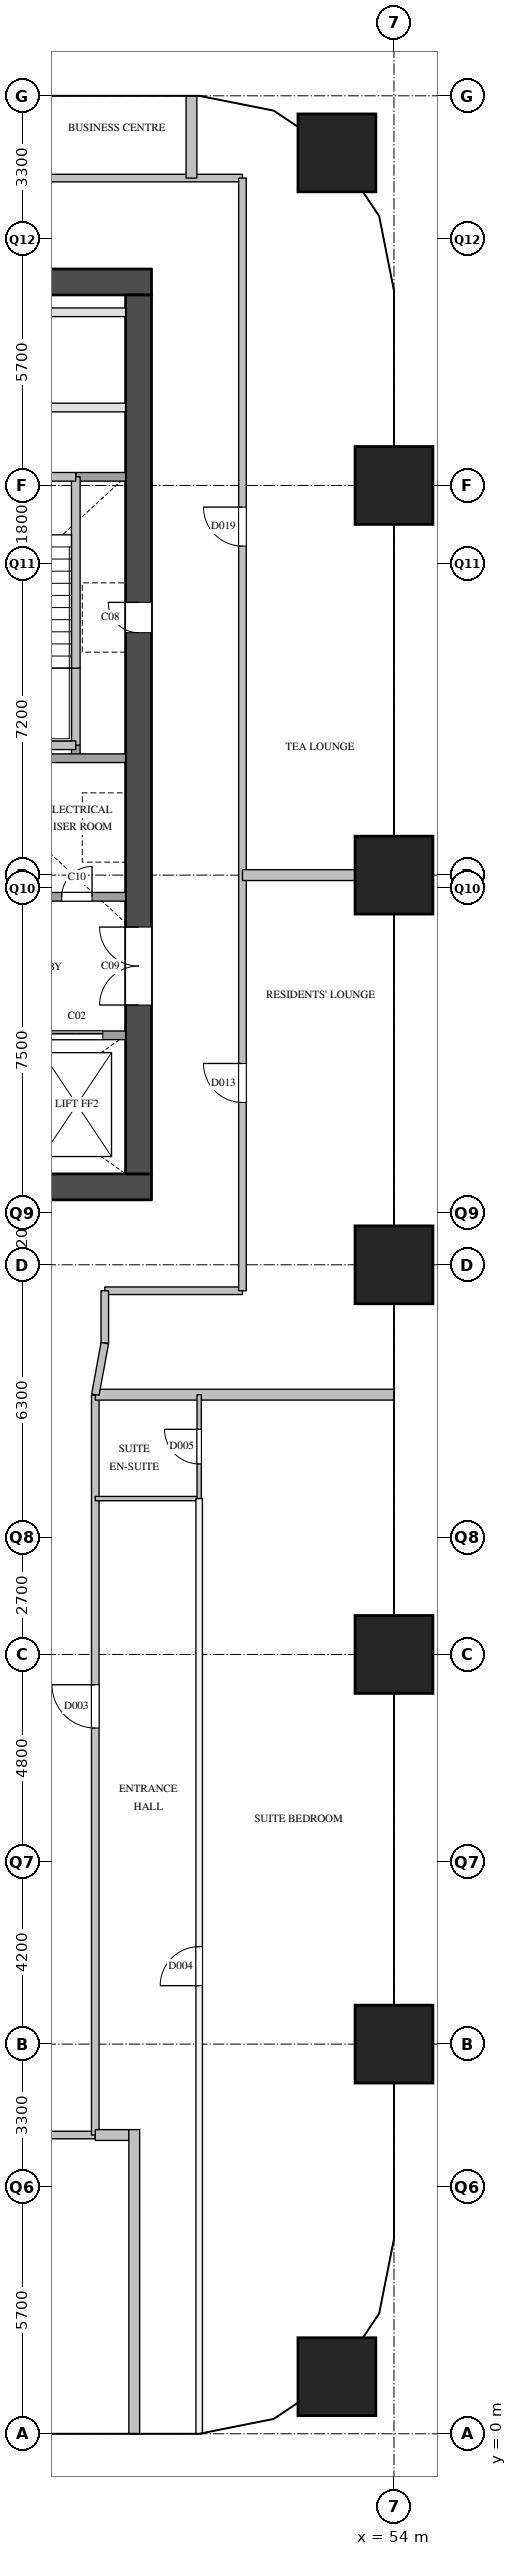
"""IFC4 building model, lengths in metres.
Left out: names, types, materials, properties, quantities, classifications, styles, units other than length and angle.
Written with IfcOpenShell. Run it as: python <this file> out.ifc"""

import sys

from ifc_helpers import new_model, si_unit, direction, frame, frame_2d, origin, origin_2d, place, context, subcontext, project, spatial, rectangle, extrude, element, fill, save


model = new_model("IFC4")
c1 = context("Model", 3, precision=1e-05, world=origin(), true_north=direction((0.0, 1.0)))
c2 = subcontext(c1, "Body", "Model", "MODEL_VIEW")
j1 = project(units=[si_unit("LENGTHUNIT", "METRE"), si_unit("PLANEANGLEUNIT", "RADIAN")], contexts=[c1])
p1 = place(None, origin())
s1 = spatial("IfcSite", under=j1, at=p1, CompositionType="ELEMENT")
p2 = place(p1, origin())
s2 = spatial("IfcBuilding", under=s1, at=p2, CompositionType="ELEMENT")
p3 = place(p2, frame((0.0, 0.0, 93.0)))
s3 = spatial("IfcBuildingStorey", under=s2, at=p3, CompositionType="ELEMENT", Elevation=93.0)
for number, where, z_axis, x_axis in (
    (1, (52.682, 1.318, 0.0), (0.0, 0.0, 1.0), (1.0, 0.0, 0.0)),
    (2, (54.0, 9.0, 0.0), (0.0, 0.0, 1.0), (1.0, 0.0, 0.0)),
    (3, (54.0, 18.0, 0.0), (0.0, 0.0, 1.0), (1.0, 0.0, 0.0)),
    (4, (54.0, 27.0, 0.0), (0.0, 0.0, 1.0), (1.0, 0.0, 0.0)),
    (5, (54.0, 36.0, 0.0), (0.0, 0.0, 1.0), (1.0, 0.0, 0.0)),
    (6, (54.0, 45.0, 0.0), (0.0, 0.0, 1.0), (1.0, 0.0, 0.0)),
    (7, (52.682, 52.682, 0.0), (0.0, 0.0, 1.0), (1.0, 0.0, 0.0)),
):
    element("IfcColumn", number, at=place(p3, frame(where, z_axis=z_axis, x_axis=x_axis)), inside=s3, PredefinedType="COLUMN", context=c2, shape_type="SweptSolid", body=[
        extrude(rectangle(XDim=1.8, YDim=1.8, at=origin_2d()), origin(), (0.0, 0.0, 1.0), 3.8),
    ])
for number, where, z_axis, x_axis in (
    (8, (36.0, 28.8, 0.0), (0.0, 0.0, 1.0), (1.0, 0.0, 0.0)),
    (9, (36.0, 49.7, 0.0), (0.0, 0.0, 1.0), (1.0, 0.0, 0.0)),
):
    element("IfcWall", number, at=place(p3, frame(where, z_axis=z_axis, x_axis=x_axis)), inside=s3, PredefinedType="SHEAR", context=c2, shape_type="SweptSolid", body=[
        extrude(rectangle(XDim=12.4, YDim=0.6, at=frame_2d((6.2, 0.0))), origin(), (0.0, 0.0, 1.0), 3.5),
    ])
p4 = place(p3, frame((48.1, 29.1, 0.0), z_axis=(0.0, 0.0, 1.0), x_axis=(0.0, 1.0, 0.0)))
e10 = element("IfcWall", 10, at=p4, inside=s3, PredefinedType="SHEAR", context=c2, shape_type="SweptSolid", body=[
    extrude(rectangle(XDim=20.3, YDim=0.6, at=frame_2d((10.15, 0.0))), origin(), (0.0, 0.0, 1.0), 3.5),
])
p5 = place(p4, frame((12.5, 0.0, 0.0)))
e11 = element("IfcOpeningElement", 11, at=p5, cuts=e10, PredefinedType="OPENING", context=c2, shape_type="SweptSolid", body=[
    extrude(rectangle(XDim=0.7, YDim=2.1, at=frame_2d((0.35, 1.05))), frame((0.0, 0.31, 0.0), z_axis=(0.0, -1.0, 0.0), x_axis=(1.0, 0.0, 0.0)), (0.0, 0.0, 1.0), 0.62),
])
p6 = place(p4, frame((3.9, 0.0, 0.0)))
e12 = element("IfcOpeningElement", 12, at=p6, cuts=e10, PredefinedType="OPENING", context=c2, shape_type="SweptSolid", body=[
    extrude(rectangle(XDim=1.8, YDim=2.1, at=frame_2d((0.9, 1.05))), frame((0.0, 0.31, 0.0), z_axis=(0.0, -1.0, 0.0), x_axis=(1.0, 0.0, 0.0)), (0.0, 0.0, 1.0), 0.62),
])
p7 = place(p3, frame((46.65, 38.7, 0.0), z_axis=(0.0, 0.0, 1.0), x_axis=(0.0, 1.0, 0.0)))
e13 = element("IfcWall", 13, at=p7, inside=s3, PredefinedType="SOLIDWALL", context=c2, shape_type="SweptSolid", body=[
    extrude(rectangle(XDim=0.3, YDim=0.2, at=frame_2d((0.15, 0.0))), origin(), (0.0, 0.0, 1.0), 3.5),
])
p8 = place(p3, frame((46.65, 39.0, 0.0), z_axis=(0.0, 0.0, 1.0), x_axis=(0.0, 1.0, 0.0)))
e14 = element("IfcWall", 14, at=p8, inside=s3, PredefinedType="SOLIDWALL", context=c2, shape_type="SweptSolid", body=[
    extrude(rectangle(XDim=1.78, YDim=0.2, at=frame_2d((0.89, 0.0))), origin(), (0.0, 0.0, 1.0), 3.5),
])
p9 = place(p3, frame((46.65, 40.78, 0.0), z_axis=(0.0, 0.0, 1.0), x_axis=(0.0, 1.0, 0.0)))
e15 = element("IfcWall", 15, at=p9, inside=s3, PredefinedType="SOLIDWALL", context=c2, shape_type="SweptSolid", body=[
    extrude(rectangle(XDim=4.42, YDim=0.2, at=frame_2d((2.21, 0.0))), origin(), (0.0, 0.0, 1.0), 3.5),
])
p10 = place(p3, frame((36.6, 32.3, 0.0), z_axis=(0.0, 0.0, 1.0), x_axis=(1.0, 0.0, 0.0)))
e16 = element("IfcWall", 16, at=p10, inside=s3, PredefinedType="SOLIDWALL", context=c2, shape_type="SweptSolid", body=[
    extrude(rectangle(XDim=11.2, YDim=0.2, at=frame_2d((5.6, 0.0))), origin(), (0.0, 0.0, 1.0), 3.5),
])
p11 = place(p10, frame((7.225, 0.0, 0.0)))
e17 = element("IfcOpeningElement", 17, at=p11, cuts=e16, PredefinedType="OPENING", context=c2, shape_type="SweptSolid", body=[
    extrude(rectangle(XDim=1.2, YDim=2.1, at=frame_2d((0.6, 1.05))), frame((0.0, 0.11, 0.0), z_axis=(0.0, -1.0, 0.0), x_axis=(1.0, 0.0, 0.0)), (0.0, 0.0, 1.0), 0.22),
])
p12 = place(p10, frame((9.475, 0.0, 0.0)))
e18 = element("IfcOpeningElement", 18, at=p12, cuts=e16, PredefinedType="OPENING", context=c2, shape_type="SweptSolid", body=[
    extrude(rectangle(XDim=1.2, YDim=2.1, at=frame_2d((0.6, 1.05))), frame((0.0, 0.11, 0.0), z_axis=(0.0, -1.0, 0.0), x_axis=(1.0, 0.0, 0.0)), (0.0, 0.0, 1.0), 0.22),
])
p13 = place(p3, frame((43.3, 35.5, 0.0), z_axis=(0.0, 0.0, 1.0), x_axis=(1.0, 0.0, 0.0)))
e19 = element("IfcWall", 19, at=p13, inside=s3, PredefinedType="SOLIDWALL", context=c2, shape_type="SweptSolid", body=[
    extrude(rectangle(XDim=4.5, YDim=0.2, at=frame_2d((2.25, 0.0))), origin(), (0.0, 0.0, 1.0), 3.5),
])
p14 = place(p13, frame((0.525, 0.0, 0.0)))
e20 = element("IfcOpeningElement", 20, at=p14, cuts=e19, PredefinedType="OPENING", context=c2, shape_type="SweptSolid", body=[
    extrude(rectangle(XDim=1.2, YDim=2.1, at=frame_2d((0.6, 1.05))), frame((0.0, 0.11, 0.0), z_axis=(0.0, -1.0, 0.0), x_axis=(1.0, 0.0, 0.0)), (0.0, 0.0, 1.0), 0.22),
])
p15 = place(p13, frame((3.025, 0.0, 0.0)))
e21 = element("IfcOpeningElement", 21, at=p15, cuts=e19, PredefinedType="OPENING", context=c2, shape_type="SweptSolid", body=[
    extrude(rectangle(XDim=0.7, YDim=2.1, at=frame_2d((0.35, 1.05))), frame((0.0, 0.11, 0.0), z_axis=(0.0, -1.0, 0.0), x_axis=(1.0, 0.0, 0.0)), (0.0, 0.0, 1.0), 0.22),
])
p16 = place(p3, frame((43.3, 38.7, 0.0), z_axis=(0.0, 0.0, 1.0), x_axis=(1.0, 0.0, 0.0)))
e22 = element("IfcWall", 22, at=p16, inside=s3, PredefinedType="SOLIDWALL", context=c2, shape_type="SweptSolid", body=[
    extrude(rectangle(XDim=4.5, YDim=0.2, at=frame_2d((2.25, 0.0))), origin(), (0.0, 0.0, 1.0), 3.5),
])
p17 = place(p3, frame((43.4, 39.0, 0.0), z_axis=(0.0, 0.0, 1.0), x_axis=(1.0, 0.0, 0.0)))
e23 = element("IfcWall", 23, at=p17, inside=s3, PredefinedType="SOLIDWALL", context=c2, shape_type="SweptSolid", body=[
    extrude(rectangle(XDim=3.25, YDim=0.2, at=frame_2d((1.625, 0.0))), origin(), (0.0, 0.0, 1.0), 3.5),
])
p18 = place(p3, frame((46.65, 45.2, 0.0), z_axis=(0.0, 0.0, 1.0), x_axis=(1.0, 0.0, 0.0)))
e24 = element("IfcWall", 24, at=p18, inside=s3, PredefinedType="SOLIDWALL", context=c2, shape_type="SweptSolid", body=[
    extrude(rectangle(XDim=1.15, YDim=0.2, at=frame_2d((0.575, 0.0))), origin(), (0.0, 0.0, 1.0), 3.5),
])
p19 = place(p3, frame((36.6, 45.2, 0.0), z_axis=(0.0, 0.0, 1.0), x_axis=(1.0, 0.0, 0.0)))
e25 = element("IfcWall", 25, at=p19, inside=s3, PredefinedType="SOLIDWALL", context=c2, shape_type="SweptSolid", body=[
    extrude(rectangle(XDim=10.05, YDim=0.2, at=frame_2d((5.025, 0.0))), origin(), (0.0, 0.0, 1.0), 3.5),
])
p20 = place(p19, frame((1.125, 0.0, 0.0)))
e26 = element("IfcOpeningElement", 26, at=p20, cuts=e25, PredefinedType="OPENING", context=c2, shape_type="SweptSolid", body=[
    extrude(rectangle(XDim=1.1, YDim=2.1, at=frame_2d((0.55, 1.05))), frame((0.0, 0.11, 0.0), z_axis=(0.0, -1.0, 0.0), x_axis=(1.0, 0.0, 0.0)), (0.0, 0.0, 1.0), 0.22),
])
p21 = place(p19, frame((4.475, 0.0, 0.0)))
e27 = element("IfcOpeningElement", 27, at=p21, cuts=e25, PredefinedType="OPENING", context=c2, shape_type="SweptSolid", body=[
    extrude(rectangle(XDim=1.1, YDim=2.1, at=frame_2d((0.55, 1.05))), frame((0.0, 0.11, 0.0), z_axis=(0.0, -1.0, 0.0), x_axis=(1.0, 0.0, 0.0)), (0.0, 0.0, 1.0), 0.22),
])
p22 = place(p19, frame((7.825, 0.0, 0.0)))
e28 = element("IfcOpeningElement", 28, at=p22, cuts=e25, PredefinedType="OPENING", context=c2, shape_type="SweptSolid", body=[
    extrude(rectangle(XDim=1.1, YDim=2.1, at=frame_2d((0.55, 1.05))), frame((0.0, 0.11, 0.0), z_axis=(0.0, -1.0, 0.0), x_axis=(1.0, 0.0, 0.0)), (0.0, 0.0, 1.0), 0.22),
])
p23 = place(p3, frame((36.6, 46.8, 0.0), z_axis=(0.0, 0.0, 1.0), x_axis=(1.0, 0.0, 0.0)))
e29 = element("IfcWall", 29, at=p23, inside=s3, PredefinedType="PARTITIONING", context=c2, shape_type="SweptSolid", body=[
    extrude(rectangle(XDim=11.2, YDim=0.2, at=frame_2d((5.6, 0.0))), origin(), (0.0, 0.0, 1.0), 3.5),
])
p24 = place(p23, frame((5.15, 0.0, 0.0)))
e30 = element("IfcOpeningElement", 30, at=p24, cuts=e29, PredefinedType="OPENING", context=c2, shape_type="SweptSolid", body=[
    extrude(rectangle(XDim=0.9, YDim=2.1, at=frame_2d((0.45, 1.05))), frame((0.0, 0.11, 0.0), z_axis=(0.0, -1.0, 0.0), x_axis=(1.0, 0.0, 0.0)), (0.0, 0.0, 1.0), 0.22),
])
p25 = place(p3, frame((36.6, 49.0, 0.0), z_axis=(0.0, 0.0, 1.0), x_axis=(1.0, 0.0, 0.0)))
e31 = element("IfcWall", 31, at=p25, inside=s3, PredefinedType="PARTITIONING", context=c2, shape_type="SweptSolid", body=[
    extrude(rectangle(XDim=11.2, YDim=0.2, at=frame_2d((5.6, 0.0))), origin(), (0.0, 0.0, 1.0), 3.5),
])
p26 = place(p3, frame((33.9, 6.9, 0.0), z_axis=(0.0, 0.0, 1.0), x_axis=(1.0, 0.0, 0.0)))
e32 = element("IfcWall", 32, at=p26, inside=s3, PredefinedType="PARTITIONING", context=c2, shape_type="SweptSolid", body=[
    extrude(rectangle(XDim=13.2, YDim=0.175, at=frame_2d((6.6, 0.0))), origin(), (0.0, 0.0, 1.0), 3.5),
])
p27 = place(p26, frame((7.2, 0.0, 0.0)))
e33 = element("IfcOpeningElement", 33, at=p27, cuts=e32, PredefinedType="OPENING", context=c2, shape_type="SweptSolid", body=[
    extrude(rectangle(XDim=0.9, YDim=2.1, at=frame_2d((0.45, 1.05))), frame((0.0, 0.097, 0.0), z_axis=(0.0, -1.0, 0.0), x_axis=(1.0, 0.0, 0.0)), (0.0, 0.0, 1.0), 0.195),
])
p28 = place(p3, frame((47.32, 26.4, 0.0), z_axis=(0.0, 0.0, 1.0), x_axis=(1.0, 0.0, 0.0)))
e34 = element("IfcWall", 34, at=p28, inside=s3, PredefinedType="PARTITIONING", context=c2, shape_type="SweptSolid", body=[
    extrude(rectangle(XDim=3.18, YDim=0.175, at=frame_2d((1.59, 0.0))), origin(), (0.0, 0.0, 1.0), 3.5),
])
p29 = place(p3, frame((33.9, 52.1, 0.0), z_axis=(0.0, 0.0, 1.0), x_axis=(1.0, 0.0, 0.0)))
e35 = element("IfcWall", 35, at=p29, inside=s3, PredefinedType="PARTITIONING", context=c2, shape_type="SweptSolid", body=[
    extrude(rectangle(XDim=16.6, YDim=0.175, at=frame_2d((8.3, 0.0))), origin(), (0.0, 0.0, 1.0), 3.5),
])
p30 = place(p29, frame((8.311, 0.0, 0.0)))
e36 = element("IfcOpeningElement", 36, at=p30, cuts=e35, PredefinedType="OPENING", context=c2, shape_type="SweptSolid", body=[
    extrude(rectangle(XDim=0.9, YDim=2.1, at=frame_2d((0.45, 1.05))), frame((0.0, 0.097, 0.0), z_axis=(0.0, -1.0, 0.0), x_axis=(1.0, 0.0, 0.0)), (0.0, 0.0, 1.0), 0.195),
])
p31 = place(p3, frame((47.1, 6.9, 0.0), z_axis=(0.0, 0.0, 1.0), x_axis=(0.0, 1.0, 0.0)))
e37 = element("IfcWall", 37, at=p31, inside=s3, PredefinedType="PARTITIONING", context=c2, shape_type="SweptSolid", body=[
    extrude(rectangle(XDim=17.09, YDim=0.175, at=frame_2d((8.545, 0.0))), origin(), (0.0, 0.0, 1.0), 3.5),
])
p32 = place(p31, frame((9.4, 0.0, 0.0)))
e38 = element("IfcOpeningElement", 38, at=p32, cuts=e37, PredefinedType="OPENING", context=c2, shape_type="SweptSolid", body=[
    extrude(rectangle(XDim=1.0, YDim=2.1, at=frame_2d((0.5, 1.05))), frame((0.0, 0.097, 0.0), z_axis=(0.0, -1.0, 0.0), x_axis=(1.0, 0.0, 0.0)), (0.0, 0.0, 1.0), 0.195),
])
p33 = place(p3, frame((47.32, 25.19, 0.0), z_axis=(0.0, 0.0, 1.0), x_axis=(0.0, 1.0, 0.0)))
e39 = element("IfcWall", 39, at=p33, inside=s3, PredefinedType="PARTITIONING", context=c2, shape_type="SweptSolid", body=[
    extrude(rectangle(XDim=1.21, YDim=0.175, at=frame_2d((0.605, 0.0))), origin(), (0.0, 0.0, 1.0), 3.5),
])
p34 = place(p3, frame((50.5, 26.4, 0.0), z_axis=(0.0, 0.0, 1.0), x_axis=(0.0, 1.0, 0.0)))
e40 = element("IfcWall", 40, at=p34, inside=s3, PredefinedType="PARTITIONING", context=c2, shape_type="SweptSolid", body=[
    extrude(rectangle(XDim=25.7, YDim=0.175, at=frame_2d((12.85, 0.0))), origin(), (0.0, 0.0, 1.0), 2.5),
])
p35 = place(p34, frame((4.35, 0.0, 0.0)))
e41 = element("IfcOpeningElement", 41, at=p35, cuts=e40, PredefinedType="OPENING", context=c2, shape_type="SweptSolid", body=[
    extrude(rectangle(XDim=0.9, YDim=2.1, at=frame_2d((0.45, 1.05))), frame((0.0, 0.097, 0.0), z_axis=(0.0, -1.0, 0.0), x_axis=(1.0, 0.0, 0.0)), (0.0, 0.0, 1.0), 0.195),
])
p36 = place(p34, frame((17.2, 0.0, 0.0)))
e42 = element("IfcOpeningElement", 42, at=p36, cuts=e40, PredefinedType="OPENING", context=c2, shape_type="SweptSolid", body=[
    extrude(rectangle(XDim=0.9, YDim=2.1, at=frame_2d((0.45, 1.05))), frame((0.0, 0.097, 0.0), z_axis=(0.0, -1.0, 0.0), x_axis=(1.0, 0.0, 0.0)), (0.0, 0.0, 1.0), 0.195),
])
p37 = place(p3, frame((49.5, 0.0, 0.0), z_axis=(0.0, 0.0, 1.0), x_axis=(0.0, 1.0, 0.0)))
e43 = element("IfcWall", 43, at=p37, inside=s3, PredefinedType="PARTITIONING", context=c2, shape_type="SweptSolid", body=[
    extrude(rectangle(XDim=21.6, YDim=0.15, at=frame_2d((10.8, 0.0))), origin(), (0.0, 0.0, 1.0), 2.5),
])
p38 = place(p37, frame((10.35, 0.0, 0.0)))
e44 = element("IfcOpeningElement", 44, at=p38, cuts=e43, PredefinedType="OPENING", context=c2, shape_type="SweptSolid", body=[
    extrude(rectangle(XDim=0.9, YDim=2.1, at=frame_2d((0.45, 1.05))), frame((0.0, 0.085, 0.0), z_axis=(0.0, -1.0, 0.0), x_axis=(1.0, 0.0, 0.0)), (0.0, 0.0, 1.0), 0.17),
])
p39 = place(p3, frame((47.1, 6.9, 0.0), z_axis=(0.0, 0.0, 1.0), x_axis=(1.0, 0.0, 0.0)))
e45 = element("IfcWall", 45, at=p39, inside=s3, PredefinedType="PARTITIONING", context=c2, shape_type="SweptSolid", body=[
    extrude(rectangle(XDim=0.775, YDim=0.25, at=frame_2d((0.387, 0.0))), origin(), (0.0, 0.0, 1.0), 3.5),
])
p40 = place(p3, frame((47.102, 24.0, 0.0), z_axis=(0.0, 0.0, 1.0), x_axis=(1.0, 0.0, 0.0)))
e46 = element("IfcWall", 46, at=p40, inside=s3, PredefinedType="PARTITIONING", context=c2, shape_type="SweptSolid", body=[
    extrude(rectangle(XDim=6.898, YDim=0.25, at=frame_2d((3.449, 0.0))), origin(), (0.0, 0.0, 1.0), 2.5),
])
p41 = place(p3, frame((50.5, 36.0, 0.0), z_axis=(0.0, 0.0, 1.0), x_axis=(1.0, 0.0, 0.0)))
e47 = element("IfcWall", 47, at=p41, inside=s3, PredefinedType="PARTITIONING", context=c2, shape_type="SweptSolid", body=[
    extrude(rectangle(XDim=3.5, YDim=0.25, at=frame_2d((1.75, 0.0))), origin(), (0.0, 0.0, 1.0), 3.5),
])
p42 = place(p3, frame((48.0, 0.0, 0.0), z_axis=(0.0, 0.0, 1.0), x_axis=(0.0, 1.0, 0.0)))
e48 = element("IfcWall", 48, at=p42, inside=s3, PredefinedType="PARTITIONING", context=c2, shape_type="SweptSolid", body=[
    extrude(rectangle(XDim=7.025, YDim=0.25, at=frame_2d((3.512, 0.0))), origin(), (0.0, 0.0, 1.0), 2.5),
])
p43 = place(p3, frame((49.322, 52.1, 0.0), z_axis=(0.0, 0.0, 1.0), x_axis=(0.0, 1.0, 0.0)))
e49 = element("IfcWall", 49, at=p43, inside=s3, PredefinedType="PARTITIONING", context=c2, shape_type="SweptSolid", body=[
    extrude(rectangle(XDim=1.9, YDim=0.25, at=frame_2d((0.95, 0.0))), origin(), (0.0, 0.0, 1.0), 2.5),
])
p44 = place(p3, frame((47.1, 21.6, 0.0), z_axis=(0.0, 0.0, 1.0), x_axis=(1.0, 0.0, 0.0)))
e50 = element("IfcWall", 50, at=p44, inside=s3, PredefinedType="PARTITIONING", context=c2, shape_type="SweptSolid", body=[
    extrude(rectangle(XDim=2.4, YDim=0.1, at=frame_2d((1.2, 0.0))), origin(), (0.0, 0.0, 1.0), 3.5),
])
p45 = place(p3, frame((49.5, 21.6, 0.0), z_axis=(0.0, 0.0, 1.0), x_axis=(0.0, 1.0, 0.0)))
e51 = element("IfcWall", 51, at=p45, inside=s3, PredefinedType="PARTITIONING", context=c2, shape_type="SweptSolid", body=[
    extrude(rectangle(XDim=2.4, YDim=0.1, at=frame_2d((1.2, 0.0))), origin(), (0.0, 0.0, 1.0), 3.5),
])
p46 = place(p45, frame((0.8, 0.0, 0.0)))
e52 = element("IfcOpeningElement", 52, at=p46, cuts=e51, PredefinedType="OPENING", context=c2, shape_type="SweptSolid", body=[
    extrude(rectangle(XDim=0.8, YDim=2.1, at=frame_2d((0.4, 1.05))), frame((0.0, 0.06, 0.0), z_axis=(0.0, -1.0, 0.0), x_axis=(1.0, 0.0, 0.0)), (0.0, 0.0, 1.0), 0.12),
])
p47 = place(p3, frame((47.32, 25.19, 0.0), z_axis=(0.0, 0.0, 1.0), x_axis=(-0.180412472784, -0.983591042895, 0.0)))
e53 = element("IfcWall", 53, at=p47, inside=s3, PredefinedType="PARTITIONING", context=c2, shape_type="SweptSolid", body=[
    extrude(rectangle(XDim=1.21, YDim=0.175, at=frame_2d((0.605, 0.0))), origin(), (0.0, 0.0, 1.0), 3.5),
])
p48 = place(p12, origin())
e54 = element("IfcDoor", 54, at=p48, inside=s3, OperationType="SLIDING_TO_LEFT", PredefinedType="DOOR", context=c2, shape_type="SweptSolid", body=[
    extrude(rectangle(XDim=1.2, YDim=2.1, at=frame_2d((0.6, 1.05))), frame((0.0, 0.025, 0.0), z_axis=(0.0, -1.0, 0.0), x_axis=(1.0, 0.0, 0.0)), (0.0, 0.0, 1.0), 0.05),
])
fill(e18, e54)
p49 = place(p5, origin())
e55 = element("IfcDoor", 55, at=p49, inside=s3, OperationType="SINGLE_SWING_RIGHT", PredefinedType="DOOR", context=c2, shape_type="SweptSolid", body=[
    extrude(rectangle(XDim=0.7, YDim=2.1, at=frame_2d((0.35, 1.05))), frame((0.0, 0.025, 0.0), z_axis=(0.0, -1.0, 0.0), x_axis=(1.0, 0.0, 0.0)), (0.0, 0.0, 1.0), 0.05),
])
fill(e11, e55)
p50 = place(p6, origin())
e56 = element("IfcDoor", 56, at=p50, inside=s3, OperationType="DOUBLE_DOOR_SINGLE_SWING", PredefinedType="DOOR", context=c2, shape_type="SweptSolid", body=[
    extrude(rectangle(XDim=1.8, YDim=2.1, at=frame_2d((0.9, 1.05))), frame((0.0, 0.025, 0.0), z_axis=(0.0, -1.0, 0.0), x_axis=(1.0, 0.0, 0.0)), (0.0, 0.0, 1.0), 0.05),
])
fill(e12, e56)
p51 = place(p15, origin())
e57 = element("IfcDoor", 57, at=p51, inside=s3, OperationType="SINGLE_SWING_RIGHT", PredefinedType="DOOR", context=c2, shape_type="SweptSolid", body=[
    extrude(rectangle(XDim=0.7, YDim=2.1, at=frame_2d((0.35, 1.05))), frame((0.0, 0.025, 0.0), z_axis=(0.0, -1.0, 0.0), x_axis=(1.0, 0.0, 0.0)), (0.0, 0.0, 1.0), 0.05),
])
fill(e21, e57)
p52 = place(p32, origin())
e58 = element("IfcDoor", 58, at=p52, inside=s3, OperationType="SINGLE_SWING_RIGHT", PredefinedType="DOOR", context=c2, shape_type="SweptSolid", body=[
    extrude(rectangle(XDim=1.0, YDim=2.1, at=frame_2d((0.5, 1.05))), frame((0.0, 0.025, 0.0), z_axis=(0.0, -1.0, 0.0), x_axis=(1.0, 0.0, 0.0)), (0.0, 0.0, 1.0), 0.05),
])
fill(e38, e58)
p53 = place(p38, origin())
e59 = element("IfcDoor", 59, at=p53, inside=s3, OperationType="SINGLE_SWING_LEFT", PredefinedType="DOOR", context=c2, shape_type="SweptSolid", body=[
    extrude(rectangle(XDim=0.9, YDim=2.1, at=frame_2d((0.45, 1.05))), frame((0.0, 0.025, 0.0), z_axis=(0.0, -1.0, 0.0), x_axis=(1.0, 0.0, 0.0)), (0.0, 0.0, 1.0), 0.05),
])
fill(e44, e59)
p54 = place(p46, origin())
e60 = element("IfcDoor", 60, at=p54, inside=s3, OperationType="SINGLE_SWING_RIGHT", PredefinedType="DOOR", context=c2, shape_type="SweptSolid", body=[
    extrude(rectangle(XDim=0.8, YDim=2.1, at=frame_2d((0.4, 1.05))), frame((0.0, 0.025, 0.0), z_axis=(0.0, -1.0, 0.0), x_axis=(1.0, 0.0, 0.0)), (0.0, 0.0, 1.0), 0.05),
])
fill(e52, e60)
p55 = place(p35, origin())
e61 = element("IfcDoor", 61, at=p55, inside=s3, OperationType="SINGLE_SWING_RIGHT", PredefinedType="DOOR", context=c2, shape_type="SweptSolid", body=[
    extrude(rectangle(XDim=0.9, YDim=2.1, at=frame_2d((0.45, 1.05))), frame((0.0, 0.025, 0.0), z_axis=(0.0, -1.0, 0.0), x_axis=(1.0, 0.0, 0.0)), (0.0, 0.0, 1.0), 0.05),
])
fill(e41, e61)
p56 = place(p36, origin())
e62 = element("IfcDoor", 62, at=p56, inside=s3, OperationType="SINGLE_SWING_RIGHT", PredefinedType="DOOR", context=c2, shape_type="SweptSolid", body=[
    extrude(rectangle(XDim=0.9, YDim=2.1, at=frame_2d((0.45, 1.05))), frame((0.0, 0.025, 0.0), z_axis=(0.0, -1.0, 0.0), x_axis=(1.0, 0.0, 0.0)), (0.0, 0.0, 1.0), 0.05),
])
fill(e42, e62)
save(model, sys.argv[1])
